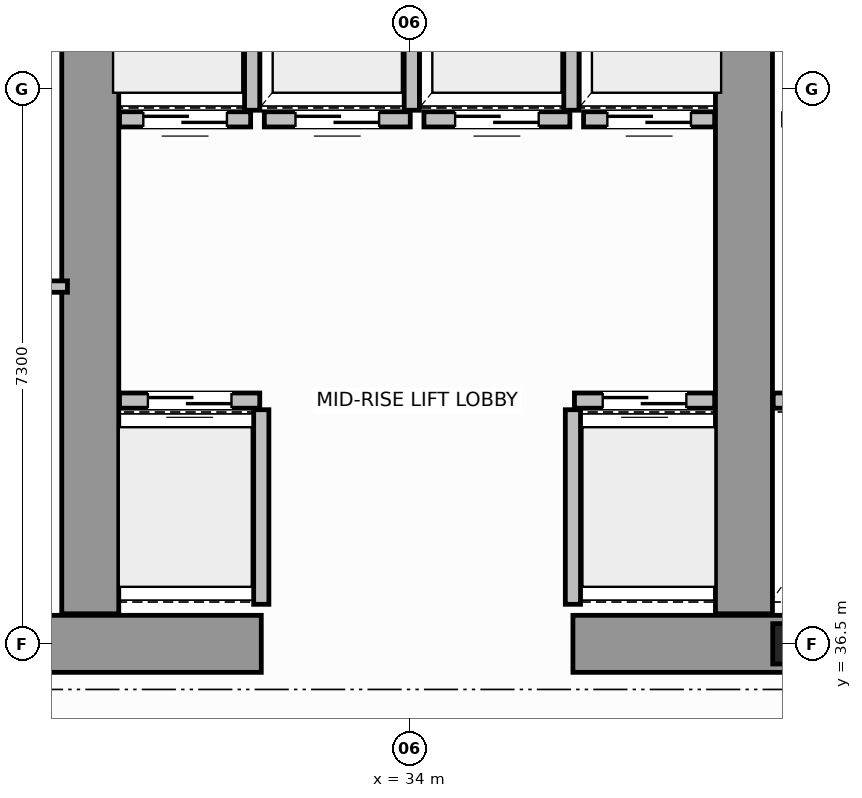
"""IFC4 building model, lengths in metres.
Left out: names, types, materials, properties, quantities, classifications, styles, units other than length and angle.
Written with IfcOpenShell. Run it as: python <this file> out.ifc"""

import sys

from ifc_helpers import new_model, si_unit, direction, frame, frame_2d, origin, origin_2d, place, context, subcontext, project, spatial, rectangle, i_section, extrude, source, transform, mapped, element, fill, save


model = new_model("IFC4")
c1 = context("Model", 3, precision=1e-05, world=origin(), true_north=direction((0.0, 1.0)))
c2 = subcontext(c1, "Body", "Model", "MODEL_VIEW")
j1 = project(units=[si_unit("LENGTHUNIT", "METRE"), si_unit("PLANEANGLEUNIT", "RADIAN")], contexts=[c1])
p1 = place(None, origin())
s1 = spatial("IfcSite", under=j1, at=p1, CompositionType="ELEMENT")
p2 = place(p1, origin())
s2 = spatial("IfcBuilding", under=s1, at=p2, CompositionType="ELEMENT")
p3 = place(p2, frame((0.0, 0.0, 114.8)))
s3 = spatial("IfcBuildingStorey", under=s2, at=p3, CompositionType="ELEMENT", Elevation=114.8)
m1 = source(origin(), c2, "Body", "SweptSolid", [
    extrude(i_section(OverallWidth=0.442, OverallDepth=0.531, WebThickness=0.065, FlangeThickness=0.076, FilletRadius=0.015, at=origin_2d()), origin(), (0.0, 0.0, 1.0), 3.8),
])
p4 = place(p3, frame((39.0, 36.5, 0.0), z_axis=(0.0, 0.0, 1.0), x_axis=(1.0, 0.0, 0.0)))
e1 = element("IfcColumn", 1, at=p4, inside=s3, PredefinedType="COLUMN", context=c2, shape_type="MappedRepresentation", body=[
    mapped(m1, transform((0.0, 0.0, 0.0), scale=1.0)),
])
for number, where, z_axis, x_axis in (
    (2, (27.55, 36.5, 0.0), (0.0, 0.0, 1.0), (1.0, 0.0, 0.0)),
    (3, (36.15, 36.5, 0.0), (0.0, 0.0, 1.0), (1.0, 0.0, 0.0)),
):
    element("IfcWall", number, at=place(p3, frame(where, z_axis=z_axis, x_axis=x_axis)), inside=s3, PredefinedType="SHEAR", context=c2, shape_type="SweptSolid", body=[
        extrude(rectangle(XDim=4.5, YDim=0.75, at=frame_2d((2.25, 0.0))), origin(), (0.0, 0.0, 1.0), 3.8),
    ])
for number, where, z_axis, x_axis in (
    (4, (29.8, 36.895, 0.0), (0.0, 0.0, 1.0), (0.0, 1.0, 0.0)),
    (5, (38.4, 36.895, 0.0), (0.0, 0.0, 1.0), (0.0, 1.0, 0.0)),
):
    element("IfcWall", number, at=place(p3, frame(where, z_axis=z_axis, x_axis=x_axis)), inside=s3, PredefinedType="SHEAR", context=c2, shape_type="SweptSolid", body=[
        extrude(rectangle(XDim=9.305, YDim=0.75, at=frame_2d((4.652, 0.0))), origin(), (0.0, 0.0, 1.0), 3.8),
    ])
p5 = place(p3, frame((30.185, 39.7, 0.0), z_axis=(0.0, 0.0, 1.0), x_axis=(1.0, 0.0, 0.0)))
e6 = element("IfcWall", 6, at=p5, inside=s3, PredefinedType="SOLIDWALL", context=c2, shape_type="SweptSolid", body=[
    extrude(rectangle(XDim=1.845, YDim=0.2, at=frame_2d((0.922, 0.0))), origin(), (0.0, 0.0, 1.0), 3.58),
])
p6 = place(p5, frame((0.373, 0.0, 0.0)))
e7 = element("IfcOpeningElement", 7, at=p6, cuts=e6, PredefinedType="OPENING", context=c2, shape_type="SweptSolid", body=[
    extrude(rectangle(XDim=1.1, YDim=2.15, at=frame_2d((0.55, 1.075))), frame((0.0, 0.11, 0.0), z_axis=(0.0, -1.0, 0.0), x_axis=(1.0, 0.0, 0.0)), (0.0, 0.0, 1.0), 0.22),
])
p7 = place(p3, frame((32.05, 37.02, 0.0), z_axis=(0.0, 0.0, 1.0), x_axis=(0.0, 1.0, 0.0)))
e8 = element("IfcWall", 8, at=p7, inside=s3, PredefinedType="SOLIDWALL", context=c2, shape_type="SweptSolid", body=[
    extrude(rectangle(XDim=2.56, YDim=0.2, at=frame_2d((1.28, 0.0))), origin(), (0.0, 0.0, 1.0), 3.58),
])
p8 = place(p3, frame((36.17, 39.7, 0.0), z_axis=(0.0, 0.0, 1.0), x_axis=(1.0, 0.0, 0.0)))
e9 = element("IfcWall", 9, at=p8, inside=s3, PredefinedType="SOLIDWALL", context=c2, shape_type="SweptSolid", body=[
    extrude(rectangle(XDim=1.845, YDim=0.2, at=frame_2d((0.922, 0.0))), origin(), (0.0, 0.0, 1.0), 3.58),
])
p9 = place(p8, frame((0.372, 0.0, 0.0)))
e10 = element("IfcOpeningElement", 10, at=p9, cuts=e9, PredefinedType="OPENING", context=c2, shape_type="SweptSolid", body=[
    extrude(rectangle(XDim=1.1, YDim=2.15, at=frame_2d((0.55, 1.075))), frame((0.0, 0.11, 0.0), z_axis=(0.0, -1.0, 0.0), x_axis=(1.0, 0.0, 0.0)), (0.0, 0.0, 1.0), 0.22),
])
p10 = place(p3, frame((36.15, 37.02, 0.0), z_axis=(0.0, 0.0, 1.0), x_axis=(0.0, 1.0, 0.0)))
e11 = element("IfcWall", 11, at=p10, inside=s3, PredefinedType="SOLIDWALL", context=c2, shape_type="SweptSolid", body=[
    extrude(rectangle(XDim=2.56, YDim=0.2, at=frame_2d((1.28, 0.0))), origin(), (0.0, 0.0, 1.0), 3.58),
])
p11 = place(p3, frame((30.185, 43.4, 0.0), z_axis=(0.0, 0.0, 1.0), x_axis=(1.0, 0.0, 0.0)))
e12 = element("IfcWall", 12, at=p11, inside=s3, PredefinedType="SOLIDWALL", context=c2, shape_type="SweptSolid", body=[
    extrude(rectangle(XDim=1.725, YDim=0.2, at=frame_2d((0.862, 0.0))), origin(), (0.0, 0.0, 1.0), 3.58),
])
p12 = place(p11, frame((0.313, 0.0, 0.0)))
e13 = element("IfcOpeningElement", 13, at=p12, cuts=e12, PredefinedType="OPENING", context=c2, shape_type="SweptSolid", body=[
    extrude(rectangle(XDim=1.1, YDim=2.15, at=frame_2d((0.55, 1.075))), frame((0.0, 0.11, 0.0), z_axis=(0.0, -1.0, 0.0), x_axis=(1.0, 0.0, 0.0)), (0.0, 0.0, 1.0), 0.22),
])
p13 = place(p3, frame((31.93, 43.52, 0.0), z_axis=(0.0, 0.0, 1.0), x_axis=(0.0, 1.0, 0.0)))
e14 = element("IfcWall", 14, at=p13, inside=s3, PredefinedType="SOLIDWALL", context=c2, shape_type="SweptSolid", body=[
    extrude(rectangle(XDim=2.56, YDim=0.2, at=frame_2d((1.28, 0.0))), origin(), (0.0, 0.0, 1.0), 3.58),
])
p14 = place(p3, frame((32.09, 43.4, 0.0), z_axis=(0.0, 0.0, 1.0), x_axis=(1.0, 0.0, 0.0)))
e15 = element("IfcWall", 15, at=p14, inside=s3, PredefinedType="SOLIDWALL", context=c2, shape_type="SweptSolid", body=[
    extrude(rectangle(XDim=1.92, YDim=0.2, at=frame_2d((0.96, 0.0))), origin(), (0.0, 0.0, 1.0), 3.58),
])
p15 = place(p14, frame((0.41, 0.0, 0.0)))
e16 = element("IfcOpeningElement", 16, at=p15, cuts=e15, PredefinedType="OPENING", context=c2, shape_type="SweptSolid", body=[
    extrude(rectangle(XDim=1.1, YDim=2.15, at=frame_2d((0.55, 1.075))), frame((0.0, 0.11, 0.0), z_axis=(0.0, -1.0, 0.0), x_axis=(1.0, 0.0, 0.0)), (0.0, 0.0, 1.0), 0.22),
])
p16 = place(p3, frame((34.03, 43.52, 0.0), z_axis=(0.0, 0.0, 1.0), x_axis=(0.0, 1.0, 0.0)))
e17 = element("IfcWall", 17, at=p16, inside=s3, PredefinedType="SOLIDWALL", context=c2, shape_type="SweptSolid", body=[
    extrude(rectangle(XDim=2.56, YDim=0.2, at=frame_2d((1.28, 0.0))), origin(), (0.0, 0.0, 1.0), 3.58),
])
p17 = place(p3, frame((34.19, 43.4, 0.0), z_axis=(0.0, 0.0, 1.0), x_axis=(1.0, 0.0, 0.0)))
e18 = element("IfcWall", 18, at=p17, inside=s3, PredefinedType="SOLIDWALL", context=c2, shape_type="SweptSolid", body=[
    extrude(rectangle(XDim=1.92, YDim=0.2, at=frame_2d((0.96, 0.0))), origin(), (0.0, 0.0, 1.0), 3.58),
])
p18 = place(p17, frame((0.41, 0.0, 0.0)))
e19 = element("IfcOpeningElement", 19, at=p18, cuts=e18, PredefinedType="OPENING", context=c2, shape_type="SweptSolid", body=[
    extrude(rectangle(XDim=1.1, YDim=2.15, at=frame_2d((0.55, 1.075))), frame((0.0, 0.11, 0.0), z_axis=(0.0, -1.0, 0.0), x_axis=(1.0, 0.0, 0.0)), (0.0, 0.0, 1.0), 0.22),
])
p19 = place(p3, frame((36.13, 43.52, 0.0), z_axis=(0.0, 0.0, 1.0), x_axis=(0.0, 1.0, 0.0)))
e20 = element("IfcWall", 20, at=p19, inside=s3, PredefinedType="SOLIDWALL", context=c2, shape_type="SweptSolid", body=[
    extrude(rectangle(XDim=2.56, YDim=0.2, at=frame_2d((1.28, 0.0))), origin(), (0.0, 0.0, 1.0), 3.58),
])
p20 = place(p3, frame((36.29, 43.4, 0.0), z_axis=(0.0, 0.0, 1.0), x_axis=(1.0, 0.0, 0.0)))
e21 = element("IfcWall", 21, at=p20, inside=s3, PredefinedType="SOLIDWALL", context=c2, shape_type="SweptSolid", body=[
    extrude(rectangle(XDim=1.725, YDim=0.2, at=frame_2d((0.862, 0.0))), origin(), (0.0, 0.0, 1.0), 3.58),
])
p21 = place(p20, frame((0.313, 0.0, 0.0)))
e22 = element("IfcOpeningElement", 22, at=p21, cuts=e21, PredefinedType="OPENING", context=c2, shape_type="SweptSolid", body=[
    extrude(rectangle(XDim=1.1, YDim=2.15, at=frame_2d((0.55, 1.075))), frame((0.0, 0.11, 0.0), z_axis=(0.0, -1.0, 0.0), x_axis=(1.0, 0.0, 0.0)), (0.0, 0.0, 1.0), 0.22),
])
p22 = place(p3, frame((38.785, 39.7, 0.0), z_axis=(0.0, 0.0, 1.0), x_axis=(1.0, 0.0, 0.0)))
e23 = element("IfcWall", 23, at=p22, inside=s3, PredefinedType="SOLIDWALL", context=c2, shape_type="SweptSolid", body=[
    extrude(rectangle(XDim=1.845, YDim=0.2, at=frame_2d((0.922, 0.0))), origin(), (0.0, 0.0, 1.0), 3.58),
])
p23 = place(p3, frame((21.5, 41.2, 0.0), z_axis=(0.0, 0.0, 1.0), x_axis=(1.0, 0.0, 0.0)))
e24 = element("IfcWall", 24, at=p23, inside=s3, PredefinedType="PARTITIONING", context=c2, shape_type="SweptSolid", body=[
    extrude(rectangle(XDim=8.0, YDim=0.15, at=frame_2d((4.0, 0.0))), origin(), (0.0, 0.0, 1.0), 3.58),
])
p24 = place(p23, frame((3.4, 0.0, 0.0)))
e25 = element("IfcOpeningElement", 25, at=p24, cuts=e24, PredefinedType="OPENING", context=c2, shape_type="SweptSolid", body=[
    extrude(rectangle(XDim=0.9, YDim=2.1, at=frame_2d((0.45, 1.05))), frame((0.0, 0.085, 0.0), z_axis=(0.0, -1.0, 0.0), x_axis=(1.0, 0.0, 0.0)), (0.0, 0.0, 1.0), 0.17),
])
m2 = source(origin(), c2, "Body", "SweptSolid", [
    extrude(rectangle(XDim=1.1, YDim=2.15, at=frame_2d((0.55, 1.075))), frame((0.0, 0.025, 0.0), z_axis=(0.0, -1.0, 0.0), x_axis=(1.0, 0.0, 0.0)), (0.0, 0.0, 1.0), 0.05),
])
p25 = place(p6, origin())
e26 = element("IfcDoor", 26, at=p25, inside=s3, OperationType="DOUBLE_DOOR_SLIDING", PredefinedType="DOOR", context=c2, shape_type="MappedRepresentation", body=[
    mapped(m2, transform((0.0, 0.0, 0.0), scale=1.0)),
])
fill(e7, e26)
p26 = place(p9, origin())
e27 = element("IfcDoor", 27, at=p26, inside=s3, OperationType="DOUBLE_DOOR_SLIDING", PredefinedType="DOOR", context=c2, shape_type="MappedRepresentation", body=[
    mapped(m2, transform((0.0, 0.0, 0.0), scale=1.0)),
])
fill(e10, e27)
p27 = place(p12, origin())
e28 = element("IfcDoor", 28, at=p27, inside=s3, OperationType="DOUBLE_DOOR_SLIDING", PredefinedType="DOOR", context=c2, shape_type="MappedRepresentation", body=[
    mapped(m2, transform((0.0, 0.0, 0.0), scale=1.0)),
])
fill(e13, e28)
p28 = place(p15, origin())
e29 = element("IfcDoor", 29, at=p28, inside=s3, OperationType="DOUBLE_DOOR_SLIDING", PredefinedType="DOOR", context=c2, shape_type="MappedRepresentation", body=[
    mapped(m2, transform((0.0, 0.0, 0.0), scale=1.0)),
])
fill(e16, e29)
p29 = place(p18, origin())
e30 = element("IfcDoor", 30, at=p29, inside=s3, OperationType="DOUBLE_DOOR_SLIDING", PredefinedType="DOOR", context=c2, shape_type="MappedRepresentation", body=[
    mapped(m2, transform((0.0, 0.0, 0.0), scale=1.0)),
])
fill(e19, e30)
p30 = place(p21, origin())
e31 = element("IfcDoor", 31, at=p30, inside=s3, OperationType="DOUBLE_DOOR_SLIDING", PredefinedType="DOOR", context=c2, shape_type="MappedRepresentation", body=[
    mapped(m2, transform((0.0, 0.0, 0.0), scale=1.0)),
])
fill(e22, e31)
save(model, sys.argv[1])
